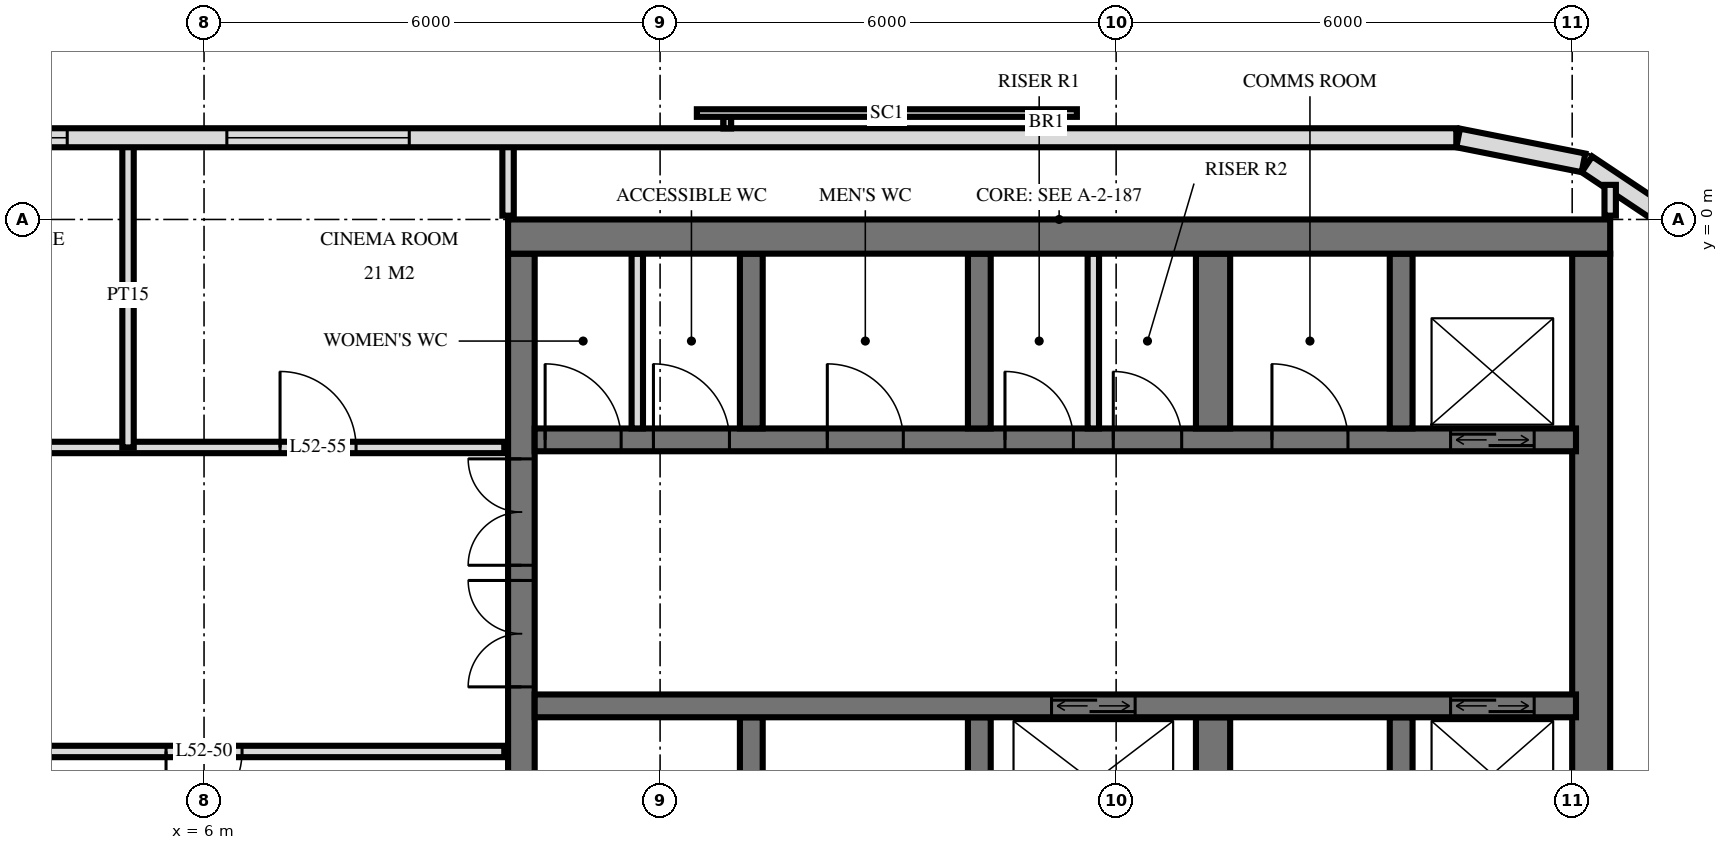
"""IFC4 building model, lengths in metres.
Left out: names, types, materials, properties, quantities, classifications, styles, units other than length and angle.
Written with IfcOpenShell. Run it as: python <this file> out.ifc"""

import sys

from ifc_helpers import new_model, si_unit, direction, frame, frame_2d, origin, place, context, subcontext, project, spatial, rectangle, extrude, element, fill, save


model = new_model("IFC4")
c1 = context("Model", 3, precision=1e-05, world=origin(), true_north=direction((0.0, 1.0)))
c2 = subcontext(c1, "Body", "Model", "MODEL_VIEW")
j1 = project(units=[si_unit("LENGTHUNIT", "METRE"), si_unit("PLANEANGLEUNIT", "RADIAN")], contexts=[c1])
p1 = place(None, origin())
s1 = spatial("IfcSite", under=j1, at=p1, CompositionType="ELEMENT")
p2 = place(p1, origin())
s2 = spatial("IfcBuilding", under=s1, at=p2, CompositionType="ELEMENT")
p3 = place(p2, frame((0.0, 0.0, 201.1)))
s3 = spatial("IfcBuildingStorey", under=s2, at=p3, CompositionType="ELEMENT", Elevation=201.1)
p4 = place(p3, frame((10.0, -0.225, 0.0), z_axis=(0.0, 0.0, 1.0), x_axis=(1.0, 0.0, 0.0)))
e1 = element("IfcWall", 1, at=p4, inside=s3, PredefinedType="SHEAR", context=c2, shape_type="SweptSolid", body=[
    extrude(rectangle(XDim=14.5, YDim=0.45, at=frame_2d((7.25, 0.0))), origin(), (0.0, 0.0, 1.0), 3.5),
])
p5 = place(p3, frame((10.175, -14.55, 0.0), z_axis=(0.0, 0.0, 1.0), x_axis=(0.0, 1.0, 0.0)))
e2 = element("IfcWall", 2, at=p5, inside=s3, PredefinedType="SHEAR", context=c2, shape_type="SweptSolid", body=[
    extrude(rectangle(XDim=14.1, YDim=0.35, at=frame_2d((7.05, 0.0))), origin(), (0.0, 0.0, 1.0), 3.5),
])
p6 = place(p5, frame((8.4, 0.0, 0.0)))
e3 = element("IfcOpeningElement", 3, at=p6, cuts=e2, PredefinedType="OPENING", context=c2, shape_type="SweptSolid", body=[
    extrude(rectangle(XDim=1.4, YDim=2.4, at=frame_2d((0.7, 1.2))), frame((0.0, 0.185, 0.0), z_axis=(0.0, -1.0, 0.0), x_axis=(1.0, 0.0, 0.0)), (0.0, 0.0, 1.0), 0.37),
])
p7 = place(p5, frame((10.0, 0.0, 0.0)))
e4 = element("IfcOpeningElement", 4, at=p7, cuts=e2, PredefinedType="OPENING", context=c2, shape_type="SweptSolid", body=[
    extrude(rectangle(XDim=1.4, YDim=2.4, at=frame_2d((0.7, 1.2))), frame((0.0, 0.185, 0.0), z_axis=(0.0, -1.0, 0.0), x_axis=(1.0, 0.0, 0.0)), (0.0, 0.0, 1.0), 0.37),
])
p8 = place(p5, frame((4.0, 0.0, 0.0)))
e5 = element("IfcOpeningElement", 5, at=p8, cuts=e2, PredefinedType="OPENING", context=c2, shape_type="SweptSolid", body=[
    extrude(rectangle(XDim=1.2, YDim=2.1, at=frame_2d((0.6, 1.05))), frame((0.0, 0.185, 0.0), z_axis=(0.0, -1.0, 0.0), x_axis=(1.0, 0.0, 0.0)), (0.0, 0.0, 1.0), 0.37),
])
p9 = place(p3, frame((24.25, -14.55, 0.0), z_axis=(0.0, 0.0, 1.0), x_axis=(0.0, 1.0, 0.0)))
e6 = element("IfcWall", 6, at=p9, inside=s3, PredefinedType="SHEAR", context=c2, shape_type="SweptSolid", body=[
    extrude(rectangle(XDim=14.1, YDim=0.5, at=frame_2d((7.05, 0.0))), origin(), (0.0, 0.0, 1.0), 3.5),
])
p10 = place(p3, frame((10.35, -2.9, 0.0), z_axis=(0.0, 0.0, 1.0), x_axis=(1.0, 0.0, 0.0)))
e7 = element("IfcWall", 7, at=p10, inside=s3, PredefinedType="SHEAR", context=c2, shape_type="SweptSolid", body=[
    extrude(rectangle(XDim=13.7, YDim=0.3, at=frame_2d((6.85, 0.0))), origin(), (0.0, 0.0, 1.0), 3.5),
])
p11 = place(p10, frame((12.05, 0.0, 0.0)))
e8 = element("IfcOpeningElement", 8, at=p11, cuts=e7, PredefinedType="OPENING", context=c2, shape_type="SweptSolid", body=[
    extrude(rectangle(XDim=1.1, YDim=2.1, at=frame_2d((0.55, 1.05))), frame((0.0, 0.16, 0.0), z_axis=(0.0, -1.0, 0.0), x_axis=(1.0, 0.0, 0.0)), (0.0, 0.0, 1.0), 0.32),
])
p12 = place(p10, frame((6.188, 0.0, 0.0)))
e9 = element("IfcOpeningElement", 9, at=p12, cuts=e7, PredefinedType="OPENING", context=c2, shape_type="SweptSolid", body=[
    extrude(rectangle(XDim=0.9, YDim=2.1, at=frame_2d((0.45, 1.05))), frame((0.0, 0.16, 0.0), z_axis=(0.0, -1.0, 0.0), x_axis=(1.0, 0.0, 0.0)), (0.0, 0.0, 1.0), 0.32),
])
p13 = place(p10, frame((7.613, 0.0, 0.0)))
e10 = element("IfcOpeningElement", 10, at=p13, cuts=e7, PredefinedType="OPENING", context=c2, shape_type="SweptSolid", body=[
    extrude(rectangle(XDim=0.9, YDim=2.1, at=frame_2d((0.45, 1.05))), frame((0.0, 0.16, 0.0), z_axis=(0.0, -1.0, 0.0), x_axis=(1.0, 0.0, 0.0)), (0.0, 0.0, 1.0), 0.32),
])
p14 = place(p10, frame((0.137, 0.0, 0.0)))
e11 = element("IfcOpeningElement", 11, at=p14, cuts=e7, PredefinedType="OPENING", context=c2, shape_type="SweptSolid", body=[
    extrude(rectangle(XDim=1.0, YDim=2.1, at=frame_2d((0.5, 1.05))), frame((0.0, 0.16, 0.0), z_axis=(0.0, -1.0, 0.0), x_axis=(1.0, 0.0, 0.0)), (0.0, 0.0, 1.0), 0.32),
])
p15 = place(p10, frame((1.562, 0.0, 0.0)))
e12 = element("IfcOpeningElement", 12, at=p15, cuts=e7, PredefinedType="OPENING", context=c2, shape_type="SweptSolid", body=[
    extrude(rectangle(XDim=1.0, YDim=2.1, at=frame_2d((0.5, 1.05))), frame((0.0, 0.16, 0.0), z_axis=(0.0, -1.0, 0.0), x_axis=(1.0, 0.0, 0.0)), (0.0, 0.0, 1.0), 0.32),
])
p16 = place(p10, frame((3.85, 0.0, 0.0)))
e13 = element("IfcOpeningElement", 13, at=p16, cuts=e7, PredefinedType="OPENING", context=c2, shape_type="SweptSolid", body=[
    extrude(rectangle(XDim=1.0, YDim=2.1, at=frame_2d((0.5, 1.05))), frame((0.0, 0.16, 0.0), z_axis=(0.0, -1.0, 0.0), x_axis=(1.0, 0.0, 0.0)), (0.0, 0.0, 1.0), 0.32),
])
p17 = place(p10, frame((9.7, 0.0, 0.0)))
e14 = element("IfcOpeningElement", 14, at=p17, cuts=e7, PredefinedType="OPENING", context=c2, shape_type="SweptSolid", body=[
    extrude(rectangle(XDim=1.0, YDim=2.1, at=frame_2d((0.5, 1.05))), frame((0.0, 0.16, 0.0), z_axis=(0.0, -1.0, 0.0), x_axis=(1.0, 0.0, 0.0)), (0.0, 0.0, 1.0), 0.32),
])
p18 = place(p3, frame((10.35, -6.4, 0.0), z_axis=(0.0, 0.0, 1.0), x_axis=(1.0, 0.0, 0.0)))
e15 = element("IfcWall", 15, at=p18, inside=s3, PredefinedType="SHEAR", context=c2, shape_type="SweptSolid", body=[
    extrude(rectangle(XDim=13.7, YDim=0.3, at=frame_2d((6.85, 0.0))), origin(), (0.0, 0.0, 1.0), 3.5),
])
p19 = place(p18, frame((12.05, 0.0, 0.0)))
e16 = element("IfcOpeningElement", 16, at=p19, cuts=e15, PredefinedType="OPENING", context=c2, shape_type="SweptSolid", body=[
    extrude(rectangle(XDim=1.1, YDim=2.1, at=frame_2d((0.55, 1.05))), frame((0.0, 0.16, 0.0), z_axis=(0.0, -1.0, 0.0), x_axis=(1.0, 0.0, 0.0)), (0.0, 0.0, 1.0), 0.32),
])
p20 = place(p18, frame((6.8, 0.0, 0.0)))
e17 = element("IfcOpeningElement", 17, at=p20, cuts=e15, PredefinedType="OPENING", context=c2, shape_type="SweptSolid", body=[
    extrude(rectangle(XDim=1.1, YDim=2.1, at=frame_2d((0.55, 1.05))), frame((0.0, 0.16, 0.0), z_axis=(0.0, -1.0, 0.0), x_axis=(1.0, 0.0, 0.0)), (0.0, 0.0, 1.0), 0.32),
])
for number, where, z_axis, x_axis in (
    (18, (13.2, -2.75, 0.0), (0.0, 0.0, 1.0), (0.0, 1.0, 0.0)),
    (19, (13.2, -8.85, 0.0), (0.0, 0.0, 1.0), (0.0, 1.0, 0.0)),
    (20, (16.2, -2.75, 0.0), (0.0, 0.0, 1.0), (0.0, 1.0, 0.0)),
    (21, (16.2, -8.85, 0.0), (0.0, 0.0, 1.0), (0.0, 1.0, 0.0)),
):
    element("IfcWall", number, at=place(p3, frame(where, z_axis=z_axis, x_axis=x_axis)), inside=s3, PredefinedType="SHEAR", context=c2, shape_type="SweptSolid", body=[
        extrude(rectangle(XDim=2.3, YDim=0.3, at=frame_2d((1.15, 0.0))), origin(), (0.0, 0.0, 1.0), 3.5),
    ])
for number, where, z_axis, x_axis in (
    (22, (19.275, -2.75, 0.0), (0.0, 0.0, 1.0), (0.0, 1.0, 0.0)),
    (23, (19.275, -8.85, 0.0), (0.0, 0.0, 1.0), (0.0, 1.0, 0.0)),
):
    element("IfcWall", number, at=place(p3, frame(where, z_axis=z_axis, x_axis=x_axis)), inside=s3, PredefinedType="SHEAR", context=c2, shape_type="SweptSolid", body=[
        extrude(rectangle(XDim=2.3, YDim=0.45, at=frame_2d((1.15, 0.0))), origin(), (0.0, 0.0, 1.0), 3.5),
    ])
for number, where, z_axis, x_axis in (
    (24, (21.75, -2.75, 0.0), (0.0, 0.0, 1.0), (0.0, 1.0, 0.0)),
    (25, (21.75, -8.85, 0.0), (0.0, 0.0, 1.0), (0.0, 1.0, 0.0)),
):
    element("IfcWall", number, at=place(p3, frame(where, z_axis=z_axis, x_axis=x_axis)), inside=s3, PredefinedType="SHEAR", context=c2, shape_type="SweptSolid", body=[
        extrude(rectangle(XDim=2.3, YDim=0.3, at=frame_2d((1.15, 0.0))), origin(), (0.0, 0.0, 1.0), 3.5),
    ])
p21 = place(p3, frame((25.571, -0.194, 0.0), z_axis=(0.0, 0.0, 1.0), x_axis=(-0.831482937015, 0.55555029066, 0.0)))
e26 = element("IfcWall", 26, at=p21, inside=s3, PredefinedType="SOLIDWALL", context=c2, shape_type="SweptSolid", body=[
    extrude(rectangle(XDim=1.656, YDim=0.25, at=frame_2d((0.828, 0.0))), origin(), (0.0, 0.0, 1.0), 3.22),
])
p22 = place(p3, frame((24.149, 0.745, 0.0), z_axis=(0.0, 0.0, 1.0), x_axis=(-0.980803419081, 0.194999110559, 0.0)))
e27 = element("IfcWall", 27, at=p22, inside=s3, PredefinedType="SOLIDWALL", context=c2, shape_type="SweptSolid", body=[
    extrude(rectangle(XDim=1.681, YDim=0.25, at=frame_2d((0.841, 0.0))), origin(), (0.0, 0.0, 1.0), 3.22),
])
p23 = place(p3, frame((22.475, 1.075, 0.0), z_axis=(0.0, 0.0, 1.0), x_axis=(-1.0, 0.0, 0.0)))
e28 = element("IfcWall", 28, at=p23, inside=s3, PredefinedType="SOLIDWALL", context=c2, shape_type="SweptSolid", body=[
    extrude(rectangle(XDim=44.951, YDim=0.25, at=frame_2d((22.475, 0.0))), origin(), (0.0, 0.0, 1.0), 3.22),
])
p24 = place(p23, frame((13.775, 0.0, 0.9)))
e29 = element("IfcOpeningElement", 29, at=p24, cuts=e28, PredefinedType="OPENING", context=c2, shape_type="SweptSolid", body=[
    extrude(rectangle(XDim=2.4, YDim=1.5, at=frame_2d((1.2, 0.75))), frame((0.0, 0.135, 0.0), z_axis=(0.0, -1.0, 0.0), x_axis=(1.0, 0.0, 0.0)), (0.0, 0.0, 1.0), 0.27),
])
p25 = place(p23, frame((18.275, 0.0, 0.9)))
e30 = element("IfcOpeningElement", 30, at=p25, cuts=e28, PredefinedType="OPENING", context=c2, shape_type="SweptSolid", body=[
    extrude(rectangle(XDim=2.4, YDim=1.5, at=frame_2d((1.2, 0.75))), frame((0.0, 0.135, 0.0), z_axis=(0.0, -1.0, 0.0), x_axis=(1.0, 0.0, 0.0)), (0.0, 0.0, 1.0), 0.27),
])
p26 = place(p23, frame((29.025, 0.0, 0.9)))
e31 = element("IfcOpeningElement", 31, at=p26, cuts=e28, PredefinedType="OPENING", context=c2, shape_type="SweptSolid", body=[
    extrude(rectangle(XDim=2.4, YDim=1.5, at=frame_2d((1.2, 0.75))), frame((0.0, 0.135, 0.0), z_axis=(0.0, -1.0, 0.0), x_axis=(1.0, 0.0, 0.0)), (0.0, 0.0, 1.0), 0.27),
])
for number, where, z_axis, x_axis in (
    (32, (17.7, -2.75, 0.0), (0.0, 0.0, 1.0), (0.0, 1.0, 0.0)),
    (33, (11.7, -2.75, 0.0), (0.0, 0.0, 1.0), (0.0, 1.0, 0.0)),
):
    element("IfcWall", number, at=place(p3, frame(where, z_axis=z_axis, x_axis=x_axis)), inside=s3, PredefinedType="PARTITIONING", context=c2, shape_type="SweptSolid", body=[
        extrude(rectangle(XDim=2.3, YDim=0.15, at=frame_2d((1.15, 0.0))), origin(), (0.0, 0.0, 1.0), 3.2),
    ])
p27 = place(p3, frame((24.5, 0.05, 0.0), z_axis=(0.0, 0.0, 1.0), x_axis=(0.0, 1.0, 0.0)))
e34 = element("IfcWall", 34, at=p27, inside=s3, PredefinedType="PARTITIONING", context=c2, shape_type="SweptSolid", body=[
    extrude(rectangle(XDim=0.405, YDim=0.15, at=frame_2d((0.203, 0.0))), origin(), (0.0, 0.0, 1.0), 3.22),
])
p28 = place(p3, frame((10.0, 0.05, 0.0), z_axis=(0.0, 0.0, 1.0), x_axis=(0.0, 1.0, 0.0)))
e35 = element("IfcWall", 35, at=p28, inside=s3, PredefinedType="PARTITIONING", context=c2, shape_type="SweptSolid", body=[
    extrude(rectangle(XDim=0.97, YDim=0.15, at=frame_2d((0.485, 0.0))), origin(), (0.0, 0.0, 1.0), 3.22),
])
p29 = place(p3, frame((5.0, -3.0, 0.0), z_axis=(0.0, 0.0, 1.0), x_axis=(0.0, 1.0, 0.0)))
e36 = element("IfcWall", 36, at=p29, inside=s3, PredefinedType="PARTITIONING", context=c2, shape_type="SweptSolid", body=[
    extrude(rectangle(XDim=4.02, YDim=0.15, at=frame_2d((2.01, 0.0))), origin(), (0.0, 0.0, 1.0), 3.22),
])
p30 = place(p3, frame((-9.95, -7.0, 0.0), z_axis=(0.0, 0.0, 1.0), x_axis=(1.0, 0.0, 0.0)))
e37 = element("IfcWall", 37, at=p30, inside=s3, PredefinedType="PARTITIONING", context=c2, shape_type="SweptSolid", body=[
    extrude(rectangle(XDim=19.9, YDim=0.15, at=frame_2d((9.95, 0.0))), origin(), (0.0, 0.0, 1.0), 3.22),
])
p31 = place(p30, frame((9.45, 0.0, 0.0)))
e38 = element("IfcOpeningElement", 38, at=p31, cuts=e37, PredefinedType="OPENING", context=c2, shape_type="SweptSolid", body=[
    extrude(rectangle(XDim=1.0, YDim=2.1, at=frame_2d((0.5, 1.05))), frame((0.0, 0.085, 0.0), z_axis=(0.0, -1.0, 0.0), x_axis=(1.0, 0.0, 0.0)), (0.0, 0.0, 1.0), 0.17),
])
p32 = place(p30, frame((15.45, 0.0, 0.0)))
e39 = element("IfcOpeningElement", 39, at=p32, cuts=e37, PredefinedType="OPENING", context=c2, shape_type="SweptSolid", body=[
    extrude(rectangle(XDim=1.0, YDim=2.1, at=frame_2d((0.5, 1.05))), frame((0.0, 0.085, 0.0), z_axis=(0.0, -1.0, 0.0), x_axis=(1.0, 0.0, 0.0)), (0.0, 0.0, 1.0), 0.17),
])
p33 = place(p3, frame((-9.95, -3.0, 0.0), z_axis=(0.0, 0.0, 1.0), x_axis=(1.0, 0.0, 0.0)))
e40 = element("IfcWall", 40, at=p33, inside=s3, PredefinedType="PARTITIONING", context=c2, shape_type="SweptSolid", body=[
    extrude(rectangle(XDim=19.9, YDim=0.15, at=frame_2d((9.95, 0.0))), origin(), (0.0, 0.0, 1.0), 3.22),
])
p34 = place(p33, frame((1.7, 0.0, 0.0)))
e41 = element("IfcOpeningElement", 41, at=p34, cuts=e40, PredefinedType="OPENING", context=c2, shape_type="SweptSolid", body=[
    extrude(rectangle(XDim=1.0, YDim=2.1, at=frame_2d((0.5, 1.05))), frame((0.0, 0.085, 0.0), z_axis=(0.0, -1.0, 0.0), x_axis=(1.0, 0.0, 0.0)), (0.0, 0.0, 1.0), 0.17),
])
p35 = place(p33, frame((5.45, 0.0, 0.0)))
e42 = element("IfcOpeningElement", 42, at=p35, cuts=e40, PredefinedType="OPENING", context=c2, shape_type="SweptSolid", body=[
    extrude(rectangle(XDim=1.0, YDim=2.1, at=frame_2d((0.5, 1.05))), frame((0.0, 0.085, 0.0), z_axis=(0.0, -1.0, 0.0), x_axis=(1.0, 0.0, 0.0)), (0.0, 0.0, 1.0), 0.17),
])
p36 = place(p33, frame((8.2, 0.0, 0.0)))
e43 = element("IfcOpeningElement", 43, at=p36, cuts=e40, PredefinedType="OPENING", context=c2, shape_type="SweptSolid", body=[
    extrude(rectangle(XDim=1.0, YDim=2.1, at=frame_2d((0.5, 1.05))), frame((0.0, 0.085, 0.0), z_axis=(0.0, -1.0, 0.0), x_axis=(1.0, 0.0, 0.0)), (0.0, 0.0, 1.0), 0.17),
])
p37 = place(p33, frame((11.95, 0.0, 0.0)))
e44 = element("IfcOpeningElement", 44, at=p37, cuts=e40, PredefinedType="OPENING", context=c2, shape_type="SweptSolid", body=[
    extrude(rectangle(XDim=1.0, YDim=2.1, at=frame_2d((0.5, 1.05))), frame((0.0, 0.085, 0.0), z_axis=(0.0, -1.0, 0.0), x_axis=(1.0, 0.0, 0.0)), (0.0, 0.0, 1.0), 0.17),
])
p38 = place(p33, frame((16.95, 0.0, 0.0)))
e45 = element("IfcOpeningElement", 45, at=p38, cuts=e40, PredefinedType="OPENING", context=c2, shape_type="SweptSolid", body=[
    extrude(rectangle(XDim=1.0, YDim=2.1, at=frame_2d((0.5, 1.05))), frame((0.0, 0.085, 0.0), z_axis=(0.0, -1.0, 0.0), x_axis=(1.0, 0.0, 0.0)), (0.0, 0.0, 1.0), 0.17),
])
p39 = place(p24, origin())
e46 = element("IfcWindow", 46, at=p39, inside=s3, PartitioningType="SINGLE_PANEL", PredefinedType="WINDOW", context=c2, shape_type="SweptSolid", body=[
    extrude(rectangle(XDim=2.4, YDim=1.5, at=frame_2d((1.2, 0.75))), frame((0.0, 0.03, 0.0), z_axis=(0.0, -1.0, 0.0), x_axis=(1.0, 0.0, 0.0)), (0.0, 0.0, 1.0), 0.06),
])
fill(e29, e46)
p40 = place(p25, origin())
e47 = element("IfcWindow", 47, at=p40, inside=s3, PartitioningType="SINGLE_PANEL", PredefinedType="WINDOW", context=c2, shape_type="SweptSolid", body=[
    extrude(rectangle(XDim=2.4, YDim=1.5, at=frame_2d((1.2, 0.75))), frame((0.0, 0.03, 0.0), z_axis=(0.0, -1.0, 0.0), x_axis=(1.0, 0.0, 0.0)), (0.0, 0.0, 1.0), 0.06),
])
fill(e30, e47)
p41 = place(p11, origin())
e48 = element("IfcDoor", 48, at=p41, inside=s3, OperationType="DOUBLE_DOOR_SLIDING", PredefinedType="USERDEFINED", context=c2, shape_type="SweptSolid", body=[
    extrude(rectangle(XDim=1.1, YDim=2.1, at=frame_2d((0.55, 1.05))), frame((0.0, 0.025, 0.0), z_axis=(0.0, -1.0, 0.0), x_axis=(1.0, 0.0, 0.0)), (0.0, 0.0, 1.0), 0.05),
])
fill(e8, e48)
p42 = place(p19, origin())
e49 = element("IfcDoor", 49, at=p42, inside=s3, OperationType="DOUBLE_DOOR_SLIDING", PredefinedType="USERDEFINED", context=c2, shape_type="SweptSolid", body=[
    extrude(rectangle(XDim=1.1, YDim=2.1, at=frame_2d((0.55, 1.05))), frame((0.0, 0.025, 0.0), z_axis=(0.0, -1.0, 0.0), x_axis=(1.0, 0.0, 0.0)), (0.0, 0.0, 1.0), 0.05),
])
fill(e16, e49)
p43 = place(p20, origin())
e50 = element("IfcDoor", 50, at=p43, inside=s3, OperationType="DOUBLE_DOOR_SLIDING", PredefinedType="USERDEFINED", context=c2, shape_type="SweptSolid", body=[
    extrude(rectangle(XDim=1.1, YDim=2.1, at=frame_2d((0.55, 1.05))), frame((0.0, 0.025, 0.0), z_axis=(0.0, -1.0, 0.0), x_axis=(1.0, 0.0, 0.0)), (0.0, 0.0, 1.0), 0.05),
])
fill(e17, e50)
p44 = place(p6, origin())
e51 = element("IfcDoor", 51, at=p44, inside=s3, OperationType="DOUBLE_DOOR_SINGLE_SWING", PredefinedType="DOOR", context=c2, shape_type="SweptSolid", body=[
    extrude(rectangle(XDim=1.4, YDim=2.4, at=frame_2d((0.7, 1.2))), frame((0.0, 0.025, 0.0), z_axis=(0.0, -1.0, 0.0), x_axis=(1.0, 0.0, 0.0)), (0.0, 0.0, 1.0), 0.05),
])
fill(e3, e51)
p45 = place(p7, origin())
e52 = element("IfcDoor", 52, at=p45, inside=s3, OperationType="DOUBLE_DOOR_SINGLE_SWING", PredefinedType="DOOR", context=c2, shape_type="SweptSolid", body=[
    extrude(rectangle(XDim=1.4, YDim=2.4, at=frame_2d((0.7, 1.2))), frame((0.0, 0.025, 0.0), z_axis=(0.0, -1.0, 0.0), x_axis=(1.0, 0.0, 0.0)), (0.0, 0.0, 1.0), 0.05),
])
fill(e4, e52)
p46 = place(p12, origin())
e53 = element("IfcDoor", 53, at=p46, inside=s3, OperationType="SINGLE_SWING_RIGHT", PredefinedType="DOOR", context=c2, shape_type="SweptSolid", body=[
    extrude(rectangle(XDim=0.9, YDim=2.1, at=frame_2d((0.45, 1.05))), frame((0.0, 0.025, 0.0), z_axis=(0.0, -1.0, 0.0), x_axis=(1.0, 0.0, 0.0)), (0.0, 0.0, 1.0), 0.05),
])
fill(e9, e53)
p47 = place(p13, origin())
e54 = element("IfcDoor", 54, at=p47, inside=s3, OperationType="SINGLE_SWING_RIGHT", PredefinedType="DOOR", context=c2, shape_type="SweptSolid", body=[
    extrude(rectangle(XDim=0.9, YDim=2.1, at=frame_2d((0.45, 1.05))), frame((0.0, 0.025, 0.0), z_axis=(0.0, -1.0, 0.0), x_axis=(1.0, 0.0, 0.0)), (0.0, 0.0, 1.0), 0.05),
])
fill(e10, e54)
p48 = place(p14, origin())
e55 = element("IfcDoor", 55, at=p48, inside=s3, OperationType="SINGLE_SWING_RIGHT", PredefinedType="DOOR", context=c2, shape_type="SweptSolid", body=[
    extrude(rectangle(XDim=1.0, YDim=2.1, at=frame_2d((0.5, 1.05))), frame((0.0, 0.025, 0.0), z_axis=(0.0, -1.0, 0.0), x_axis=(1.0, 0.0, 0.0)), (0.0, 0.0, 1.0), 0.05),
])
fill(e11, e55)
p49 = place(p15, origin())
e56 = element("IfcDoor", 56, at=p49, inside=s3, OperationType="SINGLE_SWING_RIGHT", PredefinedType="DOOR", context=c2, shape_type="SweptSolid", body=[
    extrude(rectangle(XDim=1.0, YDim=2.1, at=frame_2d((0.5, 1.05))), frame((0.0, 0.025, 0.0), z_axis=(0.0, -1.0, 0.0), x_axis=(1.0, 0.0, 0.0)), (0.0, 0.0, 1.0), 0.05),
])
fill(e12, e56)
p50 = place(p16, origin())
e57 = element("IfcDoor", 57, at=p50, inside=s3, OperationType="SINGLE_SWING_RIGHT", PredefinedType="DOOR", context=c2, shape_type="SweptSolid", body=[
    extrude(rectangle(XDim=1.0, YDim=2.1, at=frame_2d((0.5, 1.05))), frame((0.0, 0.025, 0.0), z_axis=(0.0, -1.0, 0.0), x_axis=(1.0, 0.0, 0.0)), (0.0, 0.0, 1.0), 0.05),
])
fill(e13, e57)
p51 = place(p17, origin())
e58 = element("IfcDoor", 58, at=p51, inside=s3, OperationType="SINGLE_SWING_RIGHT", PredefinedType="DOOR", context=c2, shape_type="SweptSolid", body=[
    extrude(rectangle(XDim=1.0, YDim=2.1, at=frame_2d((0.5, 1.05))), frame((0.0, 0.025, 0.0), z_axis=(0.0, -1.0, 0.0), x_axis=(1.0, 0.0, 0.0)), (0.0, 0.0, 1.0), 0.05),
])
fill(e14, e58)
p52 = place(p32, frame((0.5, 0.0, 0.0), z_axis=(0.0, 0.0, 1.0), x_axis=(-1.0, 0.0, 0.0)))
e59 = element("IfcDoor", 59, at=p52, inside=s3, OperationType="SINGLE_SWING_LEFT", PredefinedType="DOOR", context=c2, shape_type="SweptSolid", body=[
    extrude(rectangle(XDim=1.0, YDim=2.1, at=frame_2d((0.0, 1.05))), frame((0.0, -0.025, 0.0), z_axis=(0.0, 1.0, 0.0), x_axis=(-1.0, 0.0, 0.0)), (0.0, 0.0, 1.0), 0.05),
])
fill(e39, e59)
p53 = place(p38, origin())
e60 = element("IfcDoor", 60, at=p53, inside=s3, OperationType="SINGLE_SWING_RIGHT", PredefinedType="DOOR", context=c2, shape_type="SweptSolid", body=[
    extrude(rectangle(XDim=1.0, YDim=2.1, at=frame_2d((0.5, 1.05))), frame((0.0, 0.025, 0.0), z_axis=(0.0, -1.0, 0.0), x_axis=(1.0, 0.0, 0.0)), (0.0, 0.0, 1.0), 0.05),
])
fill(e45, e60)
save(model, sys.argv[1])
